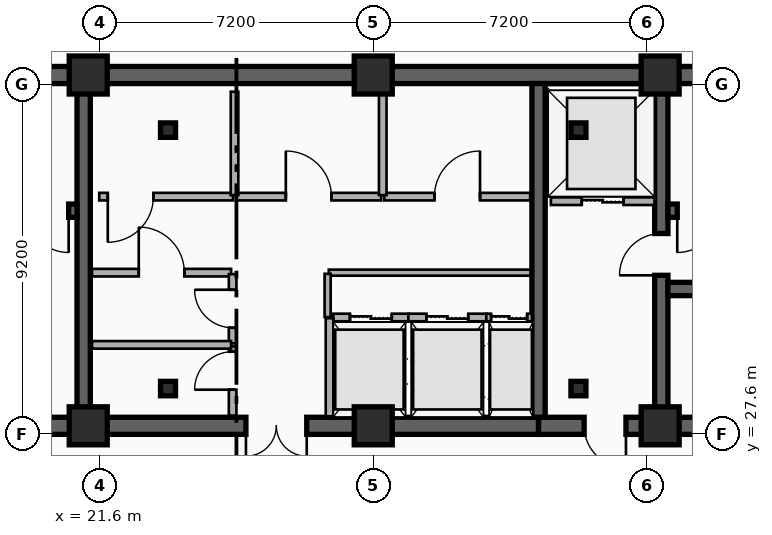
"""IFC4 building model, lengths in metres.
Left out: names, types, materials, properties, quantities, classifications, styles, units other than length and angle.
Written with IfcOpenShell. Run it as: python <this file> out.ifc"""

import sys

from ifc_helpers import new_model, si_unit, direction, frame, frame_2d, origin, origin_2d, place, context, subcontext, project, spatial, rectangle, i_section, extrude, element, fill, save


model = new_model("IFC4")
c1 = context("Model", 3, precision=1e-05, world=origin(), true_north=direction((0.0, 1.0)))
c2 = subcontext(c1, "Body", "Model", "MODEL_VIEW")
j1 = project(units=[si_unit("LENGTHUNIT", "METRE"), si_unit("PLANEANGLEUNIT", "RADIAN")], contexts=[c1])
p1 = place(None, origin())
s1 = spatial("IfcSite", under=j1, at=p1, CompositionType="ELEMENT")
p2 = place(p1, origin())
s2 = spatial("IfcBuilding", under=s1, at=p2, CompositionType="ELEMENT")
p3 = place(p2, frame((0.0, 0.0, 232.8)))
s3 = spatial("IfcBuildingStorey", under=s2, at=p3, CompositionType="ELEMENT", Elevation=232.8)
p4 = place(p3, frame((12.15, 37.05, 0.0), z_axis=(0.0, 0.0, 1.0), x_axis=(1.0, 0.0, 0.0)))
e1 = element("IfcWall", 1, at=p4, inside=s3, PredefinedType="SHEAR", context=c2, shape_type="SweptSolid", body=[
    extrude(rectangle(XDim=33.23, YDim=0.45, at=frame_2d((16.615, 0.0))), origin(), (0.0, 0.0, 1.0), 3.6),
])
p5 = place(p3, frame((21.18, 27.82, 0.0), z_axis=(0.0, 0.0, 1.0), x_axis=(-1.0, 0.0, 0.0)))
e2 = element("IfcWall", 2, at=p5, inside=s3, PredefinedType="SHEAR", context=c2, shape_type="SweptSolid", body=[
    extrude(rectangle(XDim=9.03, YDim=0.45, at=frame_2d((4.515, 0.0))), origin(), (0.0, 0.0, 1.0), 3.6),
])
p6 = place(p5, frame((2.68, 0.0, 0.0)))
e3 = element("IfcOpeningElement", 3, at=p6, cuts=e2, PredefinedType="OPENING", context=c2, shape_type="SweptSolid", body=[
    extrude(rectangle(XDim=1.1, YDim=2.15, at=frame_2d((0.55, 1.075))), frame((0.0, 0.235, 0.0), z_axis=(0.0, -1.0, 0.0), x_axis=(1.0, 0.0, 0.0)), (0.0, 0.0, 1.0), 0.47),
])
p7 = place(p3, frame((33.15, 27.82, 0.0), z_axis=(0.0, 0.0, 1.0), x_axis=(-1.0, 0.0, 0.0)))
e4 = element("IfcWall", 4, at=p7, inside=s3, PredefinedType="SHEAR", context=c2, shape_type="SweptSolid", body=[
    extrude(rectangle(XDim=11.97, YDim=0.45, at=frame_2d((5.985, 0.0))), origin(), (0.0, 0.0, 1.0), 3.6),
])
p8 = place(p7, frame((6.1, 0.0, 0.0)))
e5 = element("IfcOpeningElement", 5, at=p8, cuts=e4, PredefinedType="OPENING", context=c2, shape_type="SweptSolid", body=[
    extrude(rectangle(XDim=1.6, YDim=2.2, at=frame_2d((0.8, 1.1))), frame((0.0, 0.235, 0.0), z_axis=(0.0, -1.0, 0.0), x_axis=(1.0, 0.0, 0.0)), (0.0, 0.0, 1.0), 0.47),
])
p9 = place(p3, frame((45.38, 27.82, 0.0), z_axis=(0.0, 0.0, 1.0), x_axis=(-1.0, 0.0, 0.0)))
e6 = element("IfcWall", 6, at=p9, inside=s3, PredefinedType="SHEAR", context=c2, shape_type="SweptSolid", body=[
    extrude(rectangle(XDim=12.23, YDim=0.45, at=frame_2d((6.115, 0.0))), origin(), (0.0, 0.0, 1.0), 3.6),
])
p10 = place(p9, frame((9.93, 0.0, 0.0)))
e7 = element("IfcOpeningElement", 7, at=p10, cuts=e6, PredefinedType="OPENING", context=c2, shape_type="SweptSolid", body=[
    extrude(rectangle(XDim=1.1, YDim=2.15, at=frame_2d((0.55, 1.075))), frame((0.0, 0.235, 0.0), z_axis=(0.0, -1.0, 0.0), x_axis=(1.0, 0.0, 0.0)), (0.0, 0.0, 1.0), 0.47),
])
p11 = place(p9, frame((6.23, 0.0, 0.0)))
e8 = element("IfcOpeningElement", 8, at=p11, cuts=e6, PredefinedType="OPENING", context=c2, shape_type="SweptSolid", body=[
    extrude(rectangle(XDim=1.1, YDim=2.15, at=frame_2d((0.55, 1.075))), frame((0.0, 0.235, 0.0), z_axis=(0.0, -1.0, 0.0), x_axis=(1.0, 0.0, 0.0)), (0.0, 0.0, 1.0), 0.47),
])
for number, where, z_axis, x_axis in (
    (9, (21.18, 28.045, 0.0), (0.0, 0.0, 1.0), (0.0, 1.0, 0.0)),
    (10, (33.15, 28.045, 0.0), (0.0, 0.0, 1.0), (0.0, 1.0, 0.0)),
):
    element("IfcWall", number, at=place(p3, frame(where, z_axis=z_axis, x_axis=x_axis)), inside=s3, PredefinedType="SHEAR", context=c2, shape_type="SweptSolid", body=[
        extrude(rectangle(XDim=8.78, YDim=0.35, at=frame_2d((4.39, 0.0))), origin(), (0.0, 0.0, 1.0), 3.6),
    ])
p12 = place(p3, frame((36.38, 28.045, 0.0), z_axis=(0.0, 0.0, 1.0), x_axis=(0.0, 1.0, 0.0)))
e11 = element("IfcWall", 11, at=p12, inside=s3, PredefinedType="SHEAR", context=c2, shape_type="SweptSolid", body=[
    extrude(rectangle(XDim=8.78, YDim=0.35, at=frame_2d((4.39, 0.0))), origin(), (0.0, 0.0, 1.0), 3.6),
])
p13 = place(p12, frame((3.735, 0.0, 0.0)))
e12 = element("IfcOpeningElement", 12, at=p13, cuts=e11, PredefinedType="OPENING", context=c2, shape_type="SweptSolid", body=[
    extrude(rectangle(XDim=1.1, YDim=2.15, at=frame_2d((0.55, 1.075))), frame((0.0, 0.185, 0.0), z_axis=(0.0, -1.0, 0.0), x_axis=(1.0, 0.0, 0.0)), (0.0, 0.0, 1.0), 0.37),
])
p14 = place(p3, frame((21.005, 33.48, 0.0), z_axis=(0.0, 0.0, 1.0), x_axis=(-1.0, 0.0, 0.0)))
e13 = element("IfcWall", 13, at=p14, inside=s3, PredefinedType="SHEAR", context=c2, shape_type="SweptSolid", body=[
    extrude(rectangle(XDim=8.63, YDim=0.35, at=frame_2d((4.315, 0.0))), origin(), (0.0, 0.0, 1.0), 3.6),
])
p15 = place(p14, frame((0.22, 0.0, 0.0)))
e14 = element("IfcOpeningElement", 14, at=p15, cuts=e13, PredefinedType="OPENING", context=c2, shape_type="SweptSolid", body=[
    extrude(rectangle(XDim=1.1, YDim=2.15, at=frame_2d((0.55, 1.075))), frame((0.0, 0.185, 0.0), z_axis=(0.0, -1.0, 0.0), x_axis=(1.0, 0.0, 0.0)), (0.0, 0.0, 1.0), 0.37),
])
p16 = place(p3, frame((45.155, 33.48, 0.0), z_axis=(0.0, 0.0, 1.0), x_axis=(-1.0, 0.0, 0.0)))
e15 = element("IfcWall", 15, at=p16, inside=s3, PredefinedType="SHEAR", context=c2, shape_type="SweptSolid", body=[
    extrude(rectangle(XDim=8.6, YDim=0.35, at=frame_2d((4.3, 0.0))), origin(), (0.0, 0.0, 1.0), 3.6),
])
p17 = place(p16, frame((7.255, 0.0, 0.0)))
e16 = element("IfcOpeningElement", 16, at=p17, cuts=e15, PredefinedType="OPENING", context=c2, shape_type="SweptSolid", body=[
    extrude(rectangle(XDim=1.1, YDim=2.15, at=frame_2d((0.55, 1.075))), frame((0.0, 0.185, 0.0), z_axis=(0.0, -1.0, 0.0), x_axis=(1.0, 0.0, 0.0)), (0.0, 0.0, 1.0), 0.37),
])
p18 = place(p3, frame((36.555, 31.42, 0.0), z_axis=(0.0, 0.0, 1.0), x_axis=(1.0, 0.0, 0.0)))
e17 = element("IfcWall", 17, at=p18, inside=s3, PredefinedType="SHEAR", context=c2, shape_type="SweptSolid", body=[
    extrude(rectangle(XDim=8.6, YDim=0.35, at=frame_2d((4.3, 0.0))), origin(), (0.0, 0.0, 1.0), 3.6),
])
for number, where, z_axis, x_axis in (
    (18, (23.4, 28.8, 0.0), (0.0, 0.0, 1.0), (1.0, 0.0, 0.0)),
    (19, (34.2, 28.8, 0.0), (0.0, 0.0, 1.0), (1.0, 0.0, 0.0)),
    (20, (34.2, 35.6, 0.0), (0.0, 0.0, 1.0), (1.0, 0.0, 0.0)),
    (21, (23.4, 35.6, 0.0), (0.0, 0.0, 1.0), (1.0, 0.0, 0.0)),
):
    element("IfcColumn", number, at=place(p3, frame(where, z_axis=z_axis, x_axis=x_axis)), inside=s3, PredefinedType="COLUMN", context=c2, shape_type="SweptSolid", body=[
        extrude(i_section(OverallWidth=0.395, OverallDepth=0.38, WebThickness=0.019, FlangeThickness=0.03, FilletRadius=0.015, at=origin_2d()), origin(), (0.0, 0.0, 1.0), 3.6),
    ])
for number, where, z_axis, x_axis in (
    (22, (21.3, 27.82, 0.0), (0.0, 0.0, 1.0), (1.0, 0.0, 0.0)),
    (23, (21.3, 37.05, 0.0), (0.0, 0.0, 1.0), (1.0, 0.0, 0.0)),
    (24, (28.8, 27.82, 0.0), (0.0, 0.0, 1.0), (1.0, 0.0, 0.0)),
    (25, (28.8, 37.05, 0.0), (0.0, 0.0, 1.0), (1.0, 0.0, 0.0)),
    (26, (36.35, 27.82, 0.0), (0.0, 0.0, 1.0), (1.0, 0.0, 0.0)),
    (27, (36.35, 37.05, 0.0), (0.0, 0.0, 1.0), (1.0, 0.0, 0.0)),
):
    element("IfcColumn", number, at=place(p3, frame(where, z_axis=z_axis, x_axis=x_axis)), inside=s3, PredefinedType="COLUMN", context=c2, shape_type="SweptSolid", body=[
        extrude(rectangle(XDim=1.0, YDim=1.0, at=origin_2d()), origin(), (0.0, 0.0, 1.0), 3.6),
    ])
p19 = place(p3, frame((33.475, 33.73, 0.0), z_axis=(0.0, 0.0, 1.0), x_axis=(1.0, 0.0, 0.0)))
e28 = element("IfcWall", 28, at=p19, inside=s3, PredefinedType="PARTITIONING", context=c2, shape_type="SweptSolid", body=[
    extrude(rectangle(XDim=2.725, YDim=0.2, at=frame_2d((1.362, 0.0))), origin(), (0.0, 0.0, 1.0), 2.41),
])
p20 = place(p19, frame((0.812, 0.0, 0.0)))
e29 = element("IfcOpeningElement", 29, at=p20, cuts=e28, PredefinedType="OPENING", context=c2, shape_type="SweptSolid", body=[
    extrude(rectangle(XDim=1.1, YDim=2.15, at=frame_2d((0.55, 1.075))), frame((0.0, 0.11, 0.0), z_axis=(0.0, -1.0, 0.0), x_axis=(1.0, 0.0, 0.0)), (0.0, 0.0, 1.0), 0.22),
])
p21 = place(p3, frame((27.75, 30.67, 0.0), z_axis=(0.0, 0.0, 1.0), x_axis=(1.0, 0.0, 0.0)))
e30 = element("IfcWall", 30, at=p21, inside=s3, PredefinedType="PARTITIONING", context=c2, shape_type="SweptSolid", body=[
    extrude(rectangle(XDim=1.975, YDim=0.2, at=frame_2d((0.988, 0.0))), origin(), (0.0, 0.0, 1.0), 2.41),
])
p22 = place(p21, frame((0.438, 0.0, 0.0)))
e31 = element("IfcOpeningElement", 31, at=p22, cuts=e30, PredefinedType="OPENING", context=c2, shape_type="SweptSolid", body=[
    extrude(rectangle(XDim=1.1, YDim=2.15, at=frame_2d((0.55, 1.075))), frame((0.0, 0.11, 0.0), z_axis=(0.0, -1.0, 0.0), x_axis=(1.0, 0.0, 0.0)), (0.0, 0.0, 1.0), 0.22),
])
p23 = place(p3, frame((27.65, 28.07, 0.0), z_axis=(0.0, 0.0, 1.0), x_axis=(0.0, 1.0, 0.0)))
e32 = element("IfcWall", 32, at=p23, inside=s3, PredefinedType="PARTITIONING", context=c2, shape_type="SweptSolid", body=[
    extrude(rectangle(XDim=2.58, YDim=0.2, at=frame_2d((1.29, 0.0))), origin(), (0.0, 0.0, 1.0), 2.41),
])
p24 = place(p3, frame((29.725, 30.67, 0.0), z_axis=(0.0, 0.0, 1.0), x_axis=(1.0, 0.0, 0.0)))
e33 = element("IfcWall", 33, at=p24, inside=s3, PredefinedType="PARTITIONING", context=c2, shape_type="SweptSolid", body=[
    extrude(rectangle(XDim=2.05, YDim=0.2, at=frame_2d((1.025, 0.0))), origin(), (0.0, 0.0, 1.0), 2.72),
])
p25 = place(p24, frame((0.475, 0.0, 0.0)))
e34 = element("IfcOpeningElement", 34, at=p25, cuts=e33, PredefinedType="OPENING", context=c2, shape_type="SweptSolid", body=[
    extrude(rectangle(XDim=1.1, YDim=2.15, at=frame_2d((0.55, 1.075))), frame((0.0, 0.11, 0.0), z_axis=(0.0, -1.0, 0.0), x_axis=(1.0, 0.0, 0.0)), (0.0, 0.0, 1.0), 0.22),
])
p26 = place(p3, frame((31.775, 30.67, 0.0), z_axis=(0.0, 0.0, 1.0), x_axis=(1.0, 0.0, 0.0)))
e35 = element("IfcWall", 35, at=p26, inside=s3, PredefinedType="PARTITIONING", context=c2, shape_type="SweptSolid", body=[
    extrude(rectangle(XDim=1.2, YDim=0.2, at=frame_2d((0.6, 0.0))), origin(), (0.0, 0.0, 1.0), 2.72),
])
p27 = place(p26, frame((0.125, 0.0, 0.0)))
e36 = element("IfcOpeningElement", 36, at=p27, cuts=e35, PredefinedType="OPENING", context=c2, shape_type="SweptSolid", body=[
    extrude(rectangle(XDim=0.95, YDim=2.15, at=frame_2d((0.475, 1.075))), frame((0.0, 0.11, 0.0), z_axis=(0.0, -1.0, 0.0), x_axis=(1.0, 0.0, 0.0)), (0.0, 0.0, 1.0), 0.22),
])
p28 = place(p3, frame((21.4, 31.85, 0.0), z_axis=(0.0, 0.0, 1.0), x_axis=(1.0, 0.0, 0.0)))
e37 = element("IfcWall", 37, at=p28, inside=s3, PredefinedType="PARTITIONING", context=c2, shape_type="SweptSolid", body=[
    extrude(rectangle(XDim=3.66, YDim=0.2, at=frame_2d((1.83, 0.0))), origin(), (0.0, 0.0, 1.0), 2.41),
])
p29 = place(p28, frame((1.23, 0.0, 0.0)))
e38 = element("IfcOpeningElement", 38, at=p29, cuts=e37, PredefinedType="OPENING", context=c2, shape_type="SweptSolid", body=[
    extrude(rectangle(XDim=1.2, YDim=2.15, at=frame_2d((0.6, 1.075))), frame((0.0, 0.11, 0.0), z_axis=(0.0, -1.0, 0.0), x_axis=(1.0, 0.0, 0.0)), (0.0, 0.0, 1.0), 0.22),
])
p30 = place(p3, frame((25.11, 33.85, 0.0), z_axis=(0.0, 0.0, 1.0), x_axis=(-1.0, 0.0, 0.0)))
e39 = element("IfcWall", 39, at=p30, inside=s3, PredefinedType="PARTITIONING", context=c2, shape_type="SweptSolid", body=[
    extrude(rectangle(XDim=3.52, YDim=0.2, at=frame_2d((1.76, 0.0))), origin(), (0.0, 0.0, 1.0), 2.41),
])
p31 = place(p30, frame((2.095, 0.0, 0.0)))
e40 = element("IfcOpeningElement", 40, at=p31, cuts=e39, PredefinedType="OPENING", context=c2, shape_type="SweptSolid", body=[
    extrude(rectangle(XDim=1.2, YDim=2.15, at=frame_2d((0.6, 1.075))), frame((0.0, 0.11, 0.0), z_axis=(0.0, -1.0, 0.0), x_axis=(1.0, 0.0, 0.0)), (0.0, 0.0, 1.0), 0.22),
])
p32 = place(p3, frame((25.19, 33.85, 0.0), z_axis=(0.0, 0.0, 1.0), x_axis=(1.0, 0.0, 0.0)))
e41 = element("IfcWall", 41, at=p32, inside=s3, PredefinedType="PARTITIONING", context=c2, shape_type="SweptSolid", body=[
    extrude(rectangle(XDim=3.82, YDim=0.2, at=frame_2d((1.91, 0.0))), origin(), (0.0, 0.0, 1.0), 2.41),
])
p33 = place(p32, frame((1.31, 0.0, 0.0)))
e42 = element("IfcOpeningElement", 42, at=p33, cuts=e41, PredefinedType="OPENING", context=c2, shape_type="SweptSolid", body=[
    extrude(rectangle(XDim=1.2, YDim=2.15, at=frame_2d((0.6, 1.075))), frame((0.0, 0.11, 0.0), z_axis=(0.0, -1.0, 0.0), x_axis=(1.0, 0.0, 0.0)), (0.0, 0.0, 1.0), 0.22),
])
p34 = place(p3, frame((29.09, 33.85, 0.0), z_axis=(0.0, 0.0, 1.0), x_axis=(1.0, 0.0, 0.0)))
e43 = element("IfcWall", 43, at=p34, inside=s3, PredefinedType="PARTITIONING", context=c2, shape_type="SweptSolid", body=[
    extrude(rectangle(XDim=3.84, YDim=0.2, at=frame_2d((1.92, 0.0))), origin(), (0.0, 0.0, 1.0), 2.41),
])
p35 = place(p34, frame((1.32, 0.0, 0.0)))
e44 = element("IfcOpeningElement", 44, at=p35, cuts=e43, PredefinedType="OPENING", context=c2, shape_type="SweptSolid", body=[
    extrude(rectangle(XDim=1.2, YDim=2.15, at=frame_2d((0.6, 1.075))), frame((0.0, 0.11, 0.0), z_axis=(0.0, -1.0, 0.0), x_axis=(1.0, 0.0, 0.0)), (0.0, 0.0, 1.0), 0.22),
])
p36 = place(p3, frame((25.1, 28.09, 0.0), z_axis=(0.0, 0.0, 1.0), x_axis=(0.0, 1.0, 0.0)))
e45 = element("IfcWall", 45, at=p36, inside=s3, PredefinedType="PARTITIONING", context=c2, shape_type="SweptSolid", body=[
    extrude(rectangle(XDim=1.82, YDim=0.2, at=frame_2d((0.91, 0.0))), origin(), (0.0, 0.0, 1.0), 2.72),
])
p37 = place(p36, frame((0.68, 0.0, 0.0)))
e46 = element("IfcOpeningElement", 46, at=p37, cuts=e45, PredefinedType="OPENING", context=c2, shape_type="SweptSolid", body=[
    extrude(rectangle(XDim=1.0, YDim=2.15, at=frame_2d((0.5, 1.075))), frame((0.0, 0.11, 0.0), z_axis=(0.0, -1.0, 0.0), x_axis=(1.0, 0.0, 0.0)), (0.0, 0.0, 1.0), 0.22),
])
p38 = place(p3, frame((25.1, 29.99, 0.0), z_axis=(0.0, 0.0, 1.0), x_axis=(0.0, 1.0, 0.0)))
e47 = element("IfcWall", 47, at=p38, inside=s3, PredefinedType="PARTITIONING", context=c2, shape_type="SweptSolid", body=[
    extrude(rectangle(XDim=1.82, YDim=0.2, at=frame_2d((0.91, 0.0))), origin(), (0.0, 0.0, 1.0), 3.34),
])
p39 = place(p38, frame((0.41, 0.0, 0.0)))
e48 = element("IfcOpeningElement", 48, at=p39, cuts=e47, PredefinedType="OPENING", context=c2, shape_type="SweptSolid", body=[
    extrude(rectangle(XDim=1.0, YDim=2.15, at=frame_2d((0.5, 1.075))), frame((0.0, 0.11, 0.0), z_axis=(0.0, -1.0, 0.0), x_axis=(1.0, 0.0, 0.0)), (0.0, 0.0, 1.0), 0.22),
])
p40 = place(p3, frame((21.4, 29.95, 0.0), z_axis=(0.0, 0.0, 1.0), x_axis=(1.0, 0.0, 0.0)))
e49 = element("IfcWall", 49, at=p40, inside=s3, PredefinedType="PARTITIONING", context=c2, shape_type="SweptSolid", body=[
    extrude(rectangle(XDim=3.66, YDim=0.2, at=frame_2d((1.83, 0.0))), origin(), (0.0, 0.0, 1.0), 2.41),
])
p41 = place(p3, frame((25.15, 33.89, 0.0), z_axis=(0.0, 0.0, 1.0), x_axis=(0.0, 1.0, 0.0)))
e50 = element("IfcWall", 50, at=p41, inside=s3, PredefinedType="PARTITIONING", context=c2, shape_type="SweptSolid", body=[
    extrude(rectangle(XDim=2.72, YDim=0.2, at=frame_2d((1.36, 0.0))), origin(), (0.0, 0.0, 1.0), 3.34),
])
p42 = place(p3, frame((29.05, 33.89, 0.0), z_axis=(0.0, 0.0, 1.0), x_axis=(0.0, 1.0, 0.0)))
e51 = element("IfcWall", 51, at=p42, inside=s3, PredefinedType="PARTITIONING", context=c2, shape_type="SweptSolid", body=[
    extrude(rectangle(XDim=2.72, YDim=0.2, at=frame_2d((1.36, 0.0))), origin(), (0.0, 0.0, 1.0), 2.41),
])
p43 = place(p3, frame((27.63, 31.85, 0.0), z_axis=(0.0, 0.0, 1.0), x_axis=(1.0, 0.0, 0.0)))
e52 = element("IfcWall", 52, at=p43, inside=s3, PredefinedType="PARTITIONING", context=c2, shape_type="SweptSolid", body=[
    extrude(rectangle(XDim=5.31, YDim=0.16, at=frame_2d((2.655, 0.0))), origin(), (0.0, 0.0, 1.0), 2.41),
])
p44 = place(p3, frame((27.6, 30.68, 0.0), z_axis=(0.0, 0.0, 1.0), x_axis=(0.0, 1.0, 0.0)))
e53 = element("IfcWall", 53, at=p44, inside=s3, PredefinedType="PARTITIONING", context=c2, shape_type="SweptSolid", body=[
    extrude(rectangle(XDim=1.14, YDim=0.16, at=frame_2d((0.57, 0.0))), origin(), (0.0, 0.0, 1.0), 3.34),
])
p45 = place(p20, origin())
e54 = element("IfcDoor", 54, at=p45, inside=s3, OperationType="DOUBLE_DOOR_SLIDING", PredefinedType="DOOR", context=c2, shape_type="SweptSolid", body=[
    extrude(rectangle(XDim=1.1, YDim=2.15, at=frame_2d((0.55, 1.075))), frame((0.0, 0.025, 0.0), z_axis=(0.0, -1.0, 0.0), x_axis=(1.0, 0.0, 0.0)), (0.0, 0.0, 1.0), 0.05),
])
fill(e29, e54)
p46 = place(p22, origin())
e55 = element("IfcDoor", 55, at=p46, inside=s3, OperationType="DOUBLE_DOOR_SLIDING", PredefinedType="DOOR", context=c2, shape_type="SweptSolid", body=[
    extrude(rectangle(XDim=1.1, YDim=2.15, at=frame_2d((0.55, 1.075))), frame((0.0, 0.025, 0.0), z_axis=(0.0, -1.0, 0.0), x_axis=(1.0, 0.0, 0.0)), (0.0, 0.0, 1.0), 0.05),
])
fill(e31, e55)
p47 = place(p25, origin())
e56 = element("IfcDoor", 56, at=p47, inside=s3, OperationType="DOUBLE_DOOR_SLIDING", PredefinedType="DOOR", context=c2, shape_type="SweptSolid", body=[
    extrude(rectangle(XDim=1.1, YDim=2.15, at=frame_2d((0.55, 1.075))), frame((0.0, 0.025, 0.0), z_axis=(0.0, -1.0, 0.0), x_axis=(1.0, 0.0, 0.0)), (0.0, 0.0, 1.0), 0.05),
])
fill(e34, e56)
p48 = place(p27, origin())
e57 = element("IfcDoor", 57, at=p48, inside=s3, OperationType="DOUBLE_DOOR_SLIDING", PredefinedType="DOOR", context=c2, shape_type="SweptSolid", body=[
    extrude(rectangle(XDim=0.95, YDim=2.15, at=frame_2d((0.475, 1.075))), frame((0.0, 0.025, 0.0), z_axis=(0.0, -1.0, 0.0), x_axis=(1.0, 0.0, 0.0)), (0.0, 0.0, 1.0), 0.05),
])
fill(e36, e57)
p49 = place(p15, origin())
e58 = element("IfcDoor", 58, at=p49, inside=s3, OperationType="SINGLE_SWING_LEFT", PredefinedType="DOOR", context=c2, shape_type="SweptSolid", body=[
    extrude(rectangle(XDim=1.1, YDim=2.15, at=frame_2d((0.55, 1.075))), frame((0.0, 0.025, 0.0), z_axis=(0.0, -1.0, 0.0), x_axis=(1.0, 0.0, 0.0)), (0.0, 0.0, 1.0), 0.05),
])
fill(e14, e58)
p50 = place(p17, origin())
e59 = element("IfcDoor", 59, at=p50, inside=s3, OperationType="SINGLE_SWING_RIGHT", PredefinedType="DOOR", context=c2, shape_type="SweptSolid", body=[
    extrude(rectangle(XDim=1.1, YDim=2.15, at=frame_2d((0.55, 1.075))), frame((0.0, 0.025, 0.0), z_axis=(0.0, -1.0, 0.0), x_axis=(1.0, 0.0, 0.0)), (0.0, 0.0, 1.0), 0.05),
])
fill(e16, e59)
p51 = place(p13, origin())
e60 = element("IfcDoor", 60, at=p51, inside=s3, OperationType="SINGLE_SWING_LEFT", PredefinedType="DOOR", context=c2, shape_type="SweptSolid", body=[
    extrude(rectangle(XDim=1.1, YDim=2.15, at=frame_2d((0.55, 1.075))), frame((0.0, 0.025, 0.0), z_axis=(0.0, -1.0, 0.0), x_axis=(1.0, 0.0, 0.0)), (0.0, 0.0, 1.0), 0.05),
])
fill(e12, e60)
p52 = place(p10, origin())
e61 = element("IfcDoor", 61, at=p52, inside=s3, OperationType="SINGLE_SWING_LEFT", PredefinedType="DOOR", context=c2, shape_type="SweptSolid", body=[
    extrude(rectangle(XDim=1.1, YDim=2.15, at=frame_2d((0.55, 1.075))), frame((0.0, 0.025, 0.0), z_axis=(0.0, -1.0, 0.0), x_axis=(1.0, 0.0, 0.0)), (0.0, 0.0, 1.0), 0.05),
])
fill(e7, e61)
p53 = place(p8, origin())
e62 = element("IfcDoor", 62, at=p53, inside=s3, OperationType="SINGLE_SWING_LEFT", PredefinedType="DOOR", context=c2, shape_type="SweptSolid", body=[
    extrude(rectangle(XDim=1.6, YDim=2.2, at=frame_2d((0.8, 1.1))), frame((0.0, 0.025, 0.0), z_axis=(0.0, -1.0, 0.0), x_axis=(1.0, 0.0, 0.0)), (0.0, 0.0, 1.0), 0.05),
])
fill(e5, e62)
p54 = place(p29, origin())
e63 = element("IfcDoor", 63, at=p54, inside=s3, OperationType="SINGLE_SWING_LEFT", PredefinedType="DOOR", context=c2, shape_type="SweptSolid", body=[
    extrude(rectangle(XDim=1.2, YDim=2.15, at=frame_2d((0.6, 1.075))), frame((0.0, 0.025, 0.0), z_axis=(0.0, -1.0, 0.0), x_axis=(1.0, 0.0, 0.0)), (0.0, 0.0, 1.0), 0.05),
])
fill(e38, e63)
p55 = place(p31, origin())
e64 = element("IfcDoor", 64, at=p55, inside=s3, OperationType="SINGLE_SWING_RIGHT", PredefinedType="DOOR", context=c2, shape_type="SweptSolid", body=[
    extrude(rectangle(XDim=1.2, YDim=2.15, at=frame_2d((0.6, 1.075))), frame((0.0, 0.025, 0.0), z_axis=(0.0, -1.0, 0.0), x_axis=(1.0, 0.0, 0.0)), (0.0, 0.0, 1.0), 0.05),
])
fill(e40, e64)
p56 = place(p33, origin())
e65 = element("IfcDoor", 65, at=p56, inside=s3, OperationType="SINGLE_SWING_LEFT", PredefinedType="DOOR", context=c2, shape_type="SweptSolid", body=[
    extrude(rectangle(XDim=1.2, YDim=2.15, at=frame_2d((0.6, 1.075))), frame((0.0, 0.025, 0.0), z_axis=(0.0, -1.0, 0.0), x_axis=(1.0, 0.0, 0.0)), (0.0, 0.0, 1.0), 0.05),
])
fill(e42, e65)
p57 = place(p35, origin())
e66 = element("IfcDoor", 66, at=p57, inside=s3, OperationType="SINGLE_SWING_RIGHT", PredefinedType="DOOR", context=c2, shape_type="SweptSolid", body=[
    extrude(rectangle(XDim=1.2, YDim=2.15, at=frame_2d((0.6, 1.075))), frame((0.0, 0.025, 0.0), z_axis=(0.0, -1.0, 0.0), x_axis=(1.0, 0.0, 0.0)), (0.0, 0.0, 1.0), 0.05),
])
fill(e44, e66)
p58 = place(p37, origin())
e67 = element("IfcDoor", 67, at=p58, inside=s3, OperationType="SINGLE_SWING_LEFT", PredefinedType="DOOR", context=c2, shape_type="SweptSolid", body=[
    extrude(rectangle(XDim=1.0, YDim=2.15, at=frame_2d((0.5, 1.075))), frame((0.0, 0.025, 0.0), z_axis=(0.0, -1.0, 0.0), x_axis=(1.0, 0.0, 0.0)), (0.0, 0.0, 1.0), 0.05),
])
fill(e46, e67)
p59 = place(p39, origin())
e68 = element("IfcDoor", 68, at=p59, inside=s3, OperationType="SINGLE_SWING_RIGHT", PredefinedType="DOOR", context=c2, shape_type="SweptSolid", body=[
    extrude(rectangle(XDim=1.0, YDim=2.15, at=frame_2d((0.5, 1.075))), frame((0.0, 0.025, 0.0), z_axis=(0.0, -1.0, 0.0), x_axis=(1.0, 0.0, 0.0)), (0.0, 0.0, 1.0), 0.05),
])
fill(e48, e68)
save(model, sys.argv[1])
